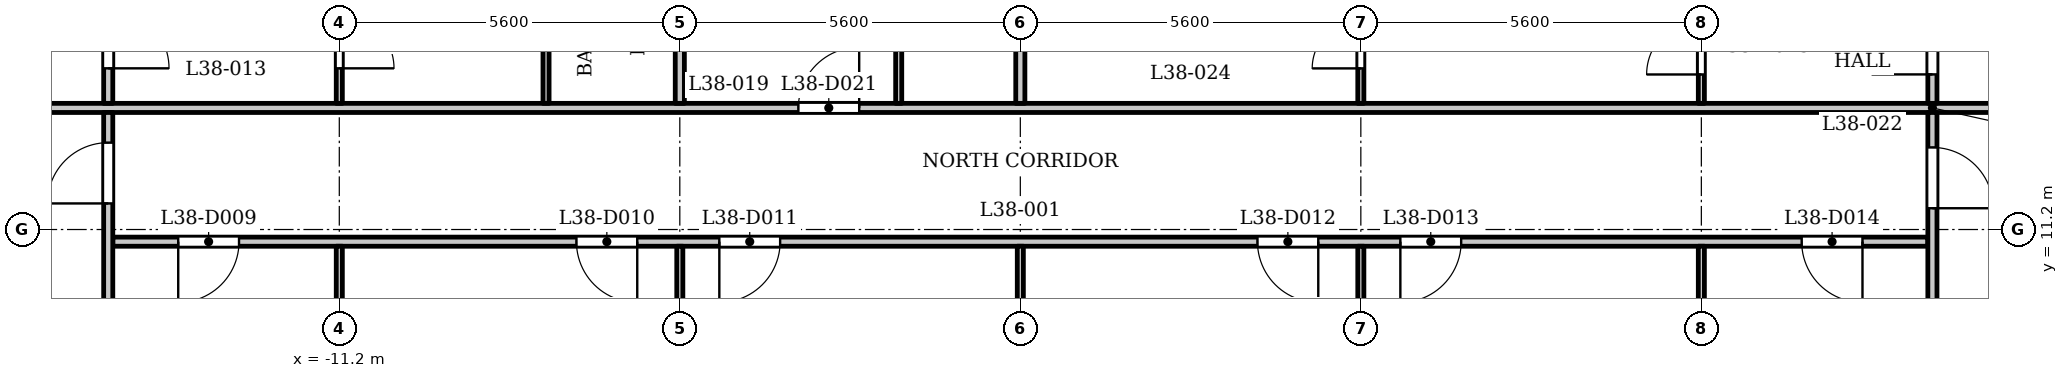
"""IFC4 building model, lengths in metres.
Left out: names, types, materials, properties, quantities, classifications, styles, units other than length and angle.
Written with IfcOpenShell. Run it as: python <this file> out.ifc"""

import sys

from ifc_helpers import new_model, si_unit, direction, frame, frame_2d, origin, place, context, subcontext, project, spatial, rectangle, extrude, element, fill, save


model = new_model("IFC4")
c1 = context("Model", 3, precision=1e-05, world=origin(), true_north=direction((0.0, 1.0)))
c2 = subcontext(c1, "Body", "Model", "MODEL_VIEW")
j1 = project(units=[si_unit("LENGTHUNIT", "METRE"), si_unit("PLANEANGLEUNIT", "RADIAN")], contexts=[c1])
p1 = place(None, origin())
s1 = spatial("IfcSite", under=j1, at=p1, CompositionType="ELEMENT")
p2 = place(p1, origin())
s2 = spatial("IfcBuilding", under=s1, at=p2, CompositionType="ELEMENT")
p3 = place(p2, frame((0.0, 0.0, 150.1)))
s3 = spatial("IfcBuildingStorey", under=s2, at=p3, CompositionType="ELEMENT", Elevation=150.1)
p4 = place(p3, frame((-14.925, 11.0, 0.0), z_axis=(0.0, 0.0, 1.0), x_axis=(1.0, 0.0, 0.0)))
e1 = element("IfcWall", 1, at=p4, inside=s3, PredefinedType="PARTITIONING", context=c2, shape_type="SweptSolid", body=[
    extrude(rectangle(XDim=29.85, YDim=0.15, at=frame_2d((14.925, 0.0))), origin(), (0.0, 0.0, 1.0), 3.2),
])
p5 = place(p4, frame((1.076, 0.0, 0.0)))
e2 = element("IfcOpeningElement", 2, at=p5, cuts=e1, PredefinedType="OPENING", context=c2, shape_type="SweptSolid", body=[
    extrude(rectangle(XDim=1.0, YDim=2.1, at=frame_2d((0.5, 1.05))), frame((0.0, 0.085, 0.0), z_axis=(0.0, -1.0, 0.0), x_axis=(1.0, 0.0, 0.0)), (0.0, 0.0, 1.0), 0.17),
])
p6 = place(p4, frame((7.625, 0.0, 0.0)))
e3 = element("IfcOpeningElement", 3, at=p6, cuts=e1, PredefinedType="OPENING", context=c2, shape_type="SweptSolid", body=[
    extrude(rectangle(XDim=1.0, YDim=2.1, at=frame_2d((0.5, 1.05))), frame((0.0, 0.085, 0.0), z_axis=(0.0, -1.0, 0.0), x_axis=(1.0, 0.0, 0.0)), (0.0, 0.0, 1.0), 0.17),
])
p7 = place(p4, frame((9.975, 0.0, 0.0)))
e4 = element("IfcOpeningElement", 4, at=p7, cuts=e1, PredefinedType="OPENING", context=c2, shape_type="SweptSolid", body=[
    extrude(rectangle(XDim=1.0, YDim=2.1, at=frame_2d((0.5, 1.05))), frame((0.0, 0.085, 0.0), z_axis=(0.0, -1.0, 0.0), x_axis=(1.0, 0.0, 0.0)), (0.0, 0.0, 1.0), 0.17),
])
p8 = place(p4, frame((18.825, 0.0, 0.0)))
e5 = element("IfcOpeningElement", 5, at=p8, cuts=e1, PredefinedType="OPENING", context=c2, shape_type="SweptSolid", body=[
    extrude(rectangle(XDim=1.0, YDim=2.1, at=frame_2d((0.5, 1.05))), frame((0.0, 0.085, 0.0), z_axis=(0.0, -1.0, 0.0), x_axis=(1.0, 0.0, 0.0)), (0.0, 0.0, 1.0), 0.17),
])
p9 = place(p4, frame((21.175, 0.0, 0.0)))
e6 = element("IfcOpeningElement", 6, at=p9, cuts=e1, PredefinedType="OPENING", context=c2, shape_type="SweptSolid", body=[
    extrude(rectangle(XDim=1.0, YDim=2.1, at=frame_2d((0.5, 1.05))), frame((0.0, 0.085, 0.0), z_axis=(0.0, -1.0, 0.0), x_axis=(1.0, 0.0, 0.0)), (0.0, 0.0, 1.0), 0.17),
])
p10 = place(p4, frame((27.775, 0.0, 0.0)))
e7 = element("IfcOpeningElement", 7, at=p10, cuts=e1, PredefinedType="OPENING", context=c2, shape_type="SweptSolid", body=[
    extrude(rectangle(XDim=1.0, YDim=2.1, at=frame_2d((0.5, 1.05))), frame((0.0, 0.085, 0.0), z_axis=(0.0, -1.0, 0.0), x_axis=(1.0, 0.0, 0.0)), (0.0, 0.0, 1.0), 0.17),
])
p11 = place(p3, frame((-17.4, 13.2, 0.0), z_axis=(0.0, 0.0, 1.0), x_axis=(1.0, 0.0, 0.0)))
e8 = element("IfcWall", 8, at=p11, inside=s3, PredefinedType="PARTITIONING", context=c2, shape_type="SweptSolid", body=[
    extrude(rectangle(XDim=34.8, YDim=0.15, at=frame_2d((17.4, 0.0))), origin(), (0.0, 0.0, 1.0), 3.2),
])
p12 = place(p11, frame((0.25, 0.0, 0.0)))
e9 = element("IfcOpeningElement", 9, at=p12, cuts=e8, PredefinedType="OPENING", context=c2, shape_type="SweptSolid", body=[
    extrude(rectangle(XDim=1.0, YDim=2.1, at=frame_2d((0.5, 1.05))), frame((0.0, 0.085, 0.0), z_axis=(0.0, -1.0, 0.0), x_axis=(1.0, 0.0, 0.0)), (0.0, 0.0, 1.0), 0.17),
])
p13 = place(p11, frame((33.65, 0.0, 0.0)))
e10 = element("IfcOpeningElement", 10, at=p13, cuts=e8, PredefinedType="OPENING", context=c2, shape_type="SweptSolid", body=[
    extrude(rectangle(XDim=1.0, YDim=2.1, at=frame_2d((0.5, 1.05))), frame((0.0, 0.085, 0.0), z_axis=(0.0, -1.0, 0.0), x_axis=(1.0, 0.0, 0.0)), (0.0, 0.0, 1.0), 0.17),
])
p14 = place(p11, frame((13.75, 0.0, 0.0)))
e11 = element("IfcOpeningElement", 11, at=p14, cuts=e8, PredefinedType="OPENING", context=c2, shape_type="SweptSolid", body=[
    extrude(rectangle(XDim=1.0, YDim=2.1, at=frame_2d((0.5, 1.05))), frame((0.0, 0.085, 0.0), z_axis=(0.0, -1.0, 0.0), x_axis=(1.0, 0.0, 0.0)), (0.0, 0.0, 1.0), 0.17),
])
p15 = place(p3, frame((-15.0, 6.769, 0.0), z_axis=(0.0, 0.0, 1.0), x_axis=(0.0, 1.0, 0.0)))
e12 = element("IfcWall", 12, at=p15, inside=s3, PredefinedType="PARTITIONING", context=c2, shape_type="SweptSolid", body=[
    extrude(rectangle(XDim=6.356, YDim=0.15, at=frame_2d((3.178, 0.0))), origin(), (0.0, 0.0, 1.0), 3.2),
])
p16 = place(p15, frame((4.86, 0.0, 0.0)))
e13 = element("IfcOpeningElement", 13, at=p16, cuts=e12, PredefinedType="OPENING", context=c2, shape_type="SweptSolid", body=[
    extrude(rectangle(XDim=1.0, YDim=2.1, at=frame_2d((0.5, 1.05))), frame((0.0, 0.085, 0.0), z_axis=(0.0, -1.0, 0.0), x_axis=(1.0, 0.0, 0.0)), (0.0, 0.0, 1.0), 0.17),
])
p17 = place(p3, frame((-15.0, 13.275, 0.0), z_axis=(0.0, 0.0, 1.0), x_axis=(0.0, 1.0, 0.0)))
e14 = element("IfcWall", 14, at=p17, inside=s3, PredefinedType="PARTITIONING", context=c2, shape_type="SweptSolid", body=[
    extrude(rectangle(XDim=2.05, YDim=0.15, at=frame_2d((1.025, 0.0))), origin(), (0.0, 0.0, 1.0), 3.2),
])
p18 = place(p17, frame((0.576, 0.0, 0.0)))
e15 = element("IfcOpeningElement", 15, at=p18, cuts=e14, PredefinedType="OPENING", context=c2, shape_type="SweptSolid", body=[
    extrude(rectangle(XDim=1.0, YDim=2.1, at=frame_2d((0.5, 1.05))), frame((0.0, 0.085, 0.0), z_axis=(0.0, -1.0, 0.0), x_axis=(1.0, 0.0, 0.0)), (0.0, 0.0, 1.0), 0.17),
])
p19 = place(p3, frame((-11.2, 7.32, 0.0), z_axis=(0.0, 0.0, 1.0), x_axis=(0.0, 1.0, 0.0)))
e16 = element("IfcWall", 16, at=p19, inside=s3, PredefinedType="PARTITIONING", context=c2, shape_type="SweptSolid", body=[
    extrude(rectangle(XDim=3.605, YDim=0.1, at=frame_2d((1.802, 0.0))), origin(), (0.0, 0.0, 1.0), 3.2),
])
p20 = place(p3, frame((-11.2, 13.275, 0.0), z_axis=(0.0, 0.0, 1.0), x_axis=(0.0, 1.0, 0.0)))
e17 = element("IfcWall", 17, at=p20, inside=s3, PredefinedType="PARTITIONING", context=c2, shape_type="SweptSolid", body=[
    extrude(rectangle(XDim=3.475, YDim=0.1, at=frame_2d((1.738, 0.0))), origin(), (0.0, 0.0, 1.0), 3.2),
])
p21 = place(p20, frame((0.576, 0.0, 0.0)))
e18 = element("IfcOpeningElement", 18, at=p21, cuts=e17, PredefinedType="OPENING", context=c2, shape_type="SweptSolid", body=[
    extrude(rectangle(XDim=0.9, YDim=2.1, at=frame_2d((0.45, 1.05))), frame((0.0, 0.06, 0.0), z_axis=(0.0, -1.0, 0.0), x_axis=(1.0, 0.0, 0.0)), (0.0, 0.0, 1.0), 0.12),
])
p22 = place(p3, frame((-7.8, 13.275, 0.0), z_axis=(0.0, 0.0, 1.0), x_axis=(0.0, 1.0, 0.0)))
e19 = element("IfcWall", 19, at=p22, inside=s3, PredefinedType="PARTITIONING", context=c2, shape_type="SweptSolid", body=[
    extrude(rectangle(XDim=3.475, YDim=0.1, at=frame_2d((1.738, 0.0))), origin(), (0.0, 0.0, 1.0), 3.2),
])
p23 = place(p3, frame((-5.6, 7.32, 0.0), z_axis=(0.0, 0.0, 1.0), x_axis=(0.0, 1.0, 0.0)))
e20 = element("IfcWall", 20, at=p23, inside=s3, PredefinedType="PARTITIONING", context=c2, shape_type="SweptSolid", body=[
    extrude(rectangle(XDim=3.605, YDim=0.1, at=frame_2d((1.802, 0.0))), origin(), (0.0, 0.0, 1.0), 3.2),
])
p24 = place(p3, frame((-5.6, 13.275, 0.0), z_axis=(0.0, 0.0, 1.0), x_axis=(0.0, 1.0, 0.0)))
e21 = element("IfcWall", 21, at=p24, inside=s3, PredefinedType="PARTITIONING", context=c2, shape_type="SweptSolid", body=[
    extrude(rectangle(XDim=3.475, YDim=0.15, at=frame_2d((1.738, 0.0))), origin(), (0.0, 0.0, 1.0), 3.2),
])
p25 = place(p3, frame((-2.0, 13.275, 0.0), z_axis=(0.0, 0.0, 1.0), x_axis=(0.0, 1.0, 0.0)))
e22 = element("IfcWall", 22, at=p25, inside=s3, PredefinedType="PARTITIONING", context=c2, shape_type="SweptSolid", body=[
    extrude(rectangle(XDim=3.475, YDim=0.1, at=frame_2d((1.738, 0.0))), origin(), (0.0, 0.0, 1.0), 3.2),
])
p26 = place(p3, frame((0.0, 7.32, 0.0), z_axis=(0.0, 0.0, 1.0), x_axis=(0.0, 1.0, 0.0)))
e23 = element("IfcWall", 23, at=p26, inside=s3, PredefinedType="PARTITIONING", context=c2, shape_type="SweptSolid", body=[
    extrude(rectangle(XDim=3.605, YDim=0.1, at=frame_2d((1.802, 0.0))), origin(), (0.0, 0.0, 1.0), 3.2),
])
p27 = place(p3, frame((0.0, 13.275, 0.0), z_axis=(0.0, 0.0, 1.0), x_axis=(0.0, 1.0, 0.0)))
e24 = element("IfcWall", 24, at=p27, inside=s3, PredefinedType="PARTITIONING", context=c2, shape_type="SweptSolid", body=[
    extrude(rectangle(XDim=3.475, YDim=0.15, at=frame_2d((1.738, 0.0))), origin(), (0.0, 0.0, 1.0), 3.2),
])
p28 = place(p3, frame((5.6, 7.32, 0.0), z_axis=(0.0, 0.0, 1.0), x_axis=(0.0, 1.0, 0.0)))
e25 = element("IfcWall", 25, at=p28, inside=s3, PredefinedType="PARTITIONING", context=c2, shape_type="SweptSolid", body=[
    extrude(rectangle(XDim=3.605, YDim=0.1, at=frame_2d((1.802, 0.0))), origin(), (0.0, 0.0, 1.0), 3.2),
])
p29 = place(p3, frame((5.6, 13.275, 0.0), z_axis=(0.0, 0.0, 1.0), x_axis=(0.0, 1.0, 0.0)))
e26 = element("IfcWall", 26, at=p29, inside=s3, PredefinedType="PARTITIONING", context=c2, shape_type="SweptSolid", body=[
    extrude(rectangle(XDim=3.475, YDim=0.1, at=frame_2d((1.738, 0.0))), origin(), (0.0, 0.0, 1.0), 3.2),
])
p30 = place(p29, frame((0.575, 0.0, 0.0)))
e27 = element("IfcOpeningElement", 27, at=p30, cuts=e26, PredefinedType="OPENING", context=c2, shape_type="SweptSolid", body=[
    extrude(rectangle(XDim=0.8, YDim=2.1, at=frame_2d((0.4, 1.05))), frame((0.0, 0.06, 0.0), z_axis=(0.0, -1.0, 0.0), x_axis=(1.0, 0.0, 0.0)), (0.0, 0.0, 1.0), 0.12),
])
p31 = place(p3, frame((11.2, 7.32, 0.0), z_axis=(0.0, 0.0, 1.0), x_axis=(0.0, 1.0, 0.0)))
e28 = element("IfcWall", 28, at=p31, inside=s3, PredefinedType="PARTITIONING", context=c2, shape_type="SweptSolid", body=[
    extrude(rectangle(XDim=3.605, YDim=0.1, at=frame_2d((1.802, 0.0))), origin(), (0.0, 0.0, 1.0), 3.2),
])
p32 = place(p3, frame((11.2, 13.275, 0.0), z_axis=(0.0, 0.0, 1.0), x_axis=(0.0, 1.0, 0.0)))
e29 = element("IfcWall", 29, at=p32, inside=s3, PredefinedType="PARTITIONING", context=c2, shape_type="SweptSolid", body=[
    extrude(rectangle(XDim=3.475, YDim=0.1, at=frame_2d((1.738, 0.0))), origin(), (0.0, 0.0, 1.0), 3.2),
])
p33 = place(p32, frame((0.475, 0.0, 0.0)))
e30 = element("IfcOpeningElement", 30, at=p33, cuts=e29, PredefinedType="OPENING", context=c2, shape_type="SweptSolid", body=[
    extrude(rectangle(XDim=0.9, YDim=2.1, at=frame_2d((0.45, 1.05))), frame((0.0, 0.06, 0.0), z_axis=(0.0, -1.0, 0.0), x_axis=(1.0, 0.0, 0.0)), (0.0, 0.0, 1.0), 0.12),
])
p34 = place(p3, frame((15.0, 6.769, 0.0), z_axis=(0.0, 0.0, 1.0), x_axis=(0.0, 1.0, 0.0)))
e31 = element("IfcWall", 31, at=p34, inside=s3, PredefinedType="PARTITIONING", context=c2, shape_type="SweptSolid", body=[
    extrude(rectangle(XDim=6.356, YDim=0.15, at=frame_2d((3.178, 0.0))), origin(), (0.0, 0.0, 1.0), 3.2),
])
p35 = place(p34, frame((4.781, 0.0, 0.0)))
e32 = element("IfcOpeningElement", 32, at=p35, cuts=e31, PredefinedType="OPENING", context=c2, shape_type="SweptSolid", body=[
    extrude(rectangle(XDim=1.0, YDim=2.1, at=frame_2d((0.5, 1.05))), frame((0.0, 0.085, 0.0), z_axis=(0.0, -1.0, 0.0), x_axis=(1.0, 0.0, 0.0)), (0.0, 0.0, 1.0), 0.17),
])
p36 = place(p3, frame((15.0, 13.275, 0.0), z_axis=(0.0, 0.0, 1.0), x_axis=(0.0, 1.0, 0.0)))
e33 = element("IfcWall", 33, at=p36, inside=s3, PredefinedType="PARTITIONING", context=c2, shape_type="SweptSolid", body=[
    extrude(rectangle(XDim=2.05, YDim=0.15, at=frame_2d((1.025, 0.0))), origin(), (0.0, 0.0, 1.0), 3.2),
])
p37 = place(p36, frame((0.476, 0.0, 0.0)))
e34 = element("IfcOpeningElement", 34, at=p37, cuts=e33, PredefinedType="OPENING", context=c2, shape_type="SweptSolid", body=[
    extrude(rectangle(XDim=1.0, YDim=2.1, at=frame_2d((0.5, 1.05))), frame((0.0, 0.085, 0.0), z_axis=(0.0, -1.0, 0.0), x_axis=(1.0, 0.0, 0.0)), (0.0, 0.0, 1.0), 0.17),
])
p38 = place(p16, origin())
e35 = element("IfcDoor", 35, at=p38, inside=s3, OperationType="SINGLE_SWING_RIGHT", PredefinedType="DOOR", context=c2, shape_type="SweptSolid", body=[
    extrude(rectangle(XDim=1.0, YDim=2.1, at=frame_2d((0.5, 1.05))), frame((0.0, 0.025, 0.0), z_axis=(0.0, -1.0, 0.0), x_axis=(1.0, 0.0, 0.0)), (0.0, 0.0, 1.0), 0.05),
])
fill(e13, e35)
p39 = place(p35, origin())
e36 = element("IfcDoor", 36, at=p39, inside=s3, OperationType="SINGLE_SWING_LEFT", PredefinedType="DOOR", context=c2, shape_type="SweptSolid", body=[
    extrude(rectangle(XDim=1.0, YDim=2.1, at=frame_2d((0.5, 1.05))), frame((0.0, 0.025, 0.0), z_axis=(0.0, -1.0, 0.0), x_axis=(1.0, 0.0, 0.0)), (0.0, 0.0, 1.0), 0.05),
])
fill(e32, e36)
p40 = place(p5, origin())
e37 = element("IfcDoor", 37, at=p40, inside=s3, OperationType="SINGLE_SWING_LEFT", PredefinedType="DOOR", context=c2, shape_type="SweptSolid", body=[
    extrude(rectangle(XDim=1.0, YDim=2.1, at=frame_2d((0.5, 1.05))), frame((0.0, 0.025, 0.0), z_axis=(0.0, -1.0, 0.0), x_axis=(1.0, 0.0, 0.0)), (0.0, 0.0, 1.0), 0.05),
])
fill(e2, e37)
p41 = place(p6, origin())
e38 = element("IfcDoor", 38, at=p41, inside=s3, OperationType="SINGLE_SWING_RIGHT", PredefinedType="DOOR", context=c2, shape_type="SweptSolid", body=[
    extrude(rectangle(XDim=1.0, YDim=2.1, at=frame_2d((0.5, 1.05))), frame((0.0, 0.025, 0.0), z_axis=(0.0, -1.0, 0.0), x_axis=(1.0, 0.0, 0.0)), (0.0, 0.0, 1.0), 0.05),
])
fill(e3, e38)
p42 = place(p7, origin())
e39 = element("IfcDoor", 39, at=p42, inside=s3, OperationType="SINGLE_SWING_LEFT", PredefinedType="DOOR", context=c2, shape_type="SweptSolid", body=[
    extrude(rectangle(XDim=1.0, YDim=2.1, at=frame_2d((0.5, 1.05))), frame((0.0, 0.025, 0.0), z_axis=(0.0, -1.0, 0.0), x_axis=(1.0, 0.0, 0.0)), (0.0, 0.0, 1.0), 0.05),
])
fill(e4, e39)
p43 = place(p8, origin())
e40 = element("IfcDoor", 40, at=p43, inside=s3, OperationType="SINGLE_SWING_RIGHT", PredefinedType="DOOR", context=c2, shape_type="SweptSolid", body=[
    extrude(rectangle(XDim=1.0, YDim=2.1, at=frame_2d((0.5, 1.05))), frame((0.0, 0.025, 0.0), z_axis=(0.0, -1.0, 0.0), x_axis=(1.0, 0.0, 0.0)), (0.0, 0.0, 1.0), 0.05),
])
fill(e5, e40)
p44 = place(p9, origin())
e41 = element("IfcDoor", 41, at=p44, inside=s3, OperationType="SINGLE_SWING_LEFT", PredefinedType="DOOR", context=c2, shape_type="SweptSolid", body=[
    extrude(rectangle(XDim=1.0, YDim=2.1, at=frame_2d((0.5, 1.05))), frame((0.0, 0.025, 0.0), z_axis=(0.0, -1.0, 0.0), x_axis=(1.0, 0.0, 0.0)), (0.0, 0.0, 1.0), 0.05),
])
fill(e6, e41)
p45 = place(p10, origin())
e42 = element("IfcDoor", 42, at=p45, inside=s3, OperationType="SINGLE_SWING_RIGHT", PredefinedType="DOOR", context=c2, shape_type="SweptSolid", body=[
    extrude(rectangle(XDim=1.0, YDim=2.1, at=frame_2d((0.5, 1.05))), frame((0.0, 0.025, 0.0), z_axis=(0.0, -1.0, 0.0), x_axis=(1.0, 0.0, 0.0)), (0.0, 0.0, 1.0), 0.05),
])
fill(e7, e42)
p46 = place(p18, origin())
e43 = element("IfcDoor", 43, at=p46, inside=s3, OperationType="SINGLE_SWING_LEFT", PredefinedType="DOOR", context=c2, shape_type="SweptSolid", body=[
    extrude(rectangle(XDim=1.0, YDim=2.1, at=frame_2d((0.5, 1.05))), frame((0.0, 0.025, 0.0), z_axis=(0.0, -1.0, 0.0), x_axis=(1.0, 0.0, 0.0)), (0.0, 0.0, 1.0), 0.05),
])
fill(e15, e43)
p47 = place(p21, origin())
e44 = element("IfcDoor", 44, at=p47, inside=s3, OperationType="SINGLE_SWING_LEFT", PredefinedType="DOOR", context=c2, shape_type="SweptSolid", body=[
    extrude(rectangle(XDim=0.9, YDim=2.1, at=frame_2d((0.45, 1.05))), frame((0.0, 0.025, 0.0), z_axis=(0.0, -1.0, 0.0), x_axis=(1.0, 0.0, 0.0)), (0.0, 0.0, 1.0), 0.05),
])
fill(e18, e44)
p48 = place(p14, origin())
e45 = element("IfcDoor", 45, at=p48, inside=s3, OperationType="SINGLE_SWING_LEFT", PredefinedType="DOOR", context=c2, shape_type="SweptSolid", body=[
    extrude(rectangle(XDim=1.0, YDim=2.1, at=frame_2d((0.5, 1.05))), frame((0.0, 0.025, 0.0), z_axis=(0.0, -1.0, 0.0), x_axis=(1.0, 0.0, 0.0)), (0.0, 0.0, 1.0), 0.05),
])
fill(e11, e45)
p49 = place(p37, origin())
e46 = element("IfcDoor", 46, at=p49, inside=s3, OperationType="SINGLE_SWING_RIGHT", PredefinedType="DOOR", context=c2, shape_type="SweptSolid", body=[
    extrude(rectangle(XDim=1.0, YDim=2.1, at=frame_2d((0.5, 1.05))), frame((0.0, 0.025, 0.0), z_axis=(0.0, -1.0, 0.0), x_axis=(1.0, 0.0, 0.0)), (0.0, 0.0, 1.0), 0.05),
])
fill(e34, e46)
p50 = place(p33, origin())
e47 = element("IfcDoor", 47, at=p50, inside=s3, OperationType="SINGLE_SWING_RIGHT", PredefinedType="DOOR", context=c2, shape_type="SweptSolid", body=[
    extrude(rectangle(XDim=0.9, YDim=2.1, at=frame_2d((0.45, 1.05))), frame((0.0, 0.025, 0.0), z_axis=(0.0, -1.0, 0.0), x_axis=(1.0, 0.0, 0.0)), (0.0, 0.0, 1.0), 0.05),
])
fill(e30, e47)
p51 = place(p30, origin())
e48 = element("IfcDoor", 48, at=p51, inside=s3, OperationType="SINGLE_SWING_RIGHT", PredefinedType="DOOR", context=c2, shape_type="SweptSolid", body=[
    extrude(rectangle(XDim=0.8, YDim=2.1, at=frame_2d((0.4, 1.05))), frame((0.0, 0.025, 0.0), z_axis=(0.0, -1.0, 0.0), x_axis=(1.0, 0.0, 0.0)), (0.0, 0.0, 1.0), 0.05),
])
fill(e27, e48)
save(model, sys.argv[1])
